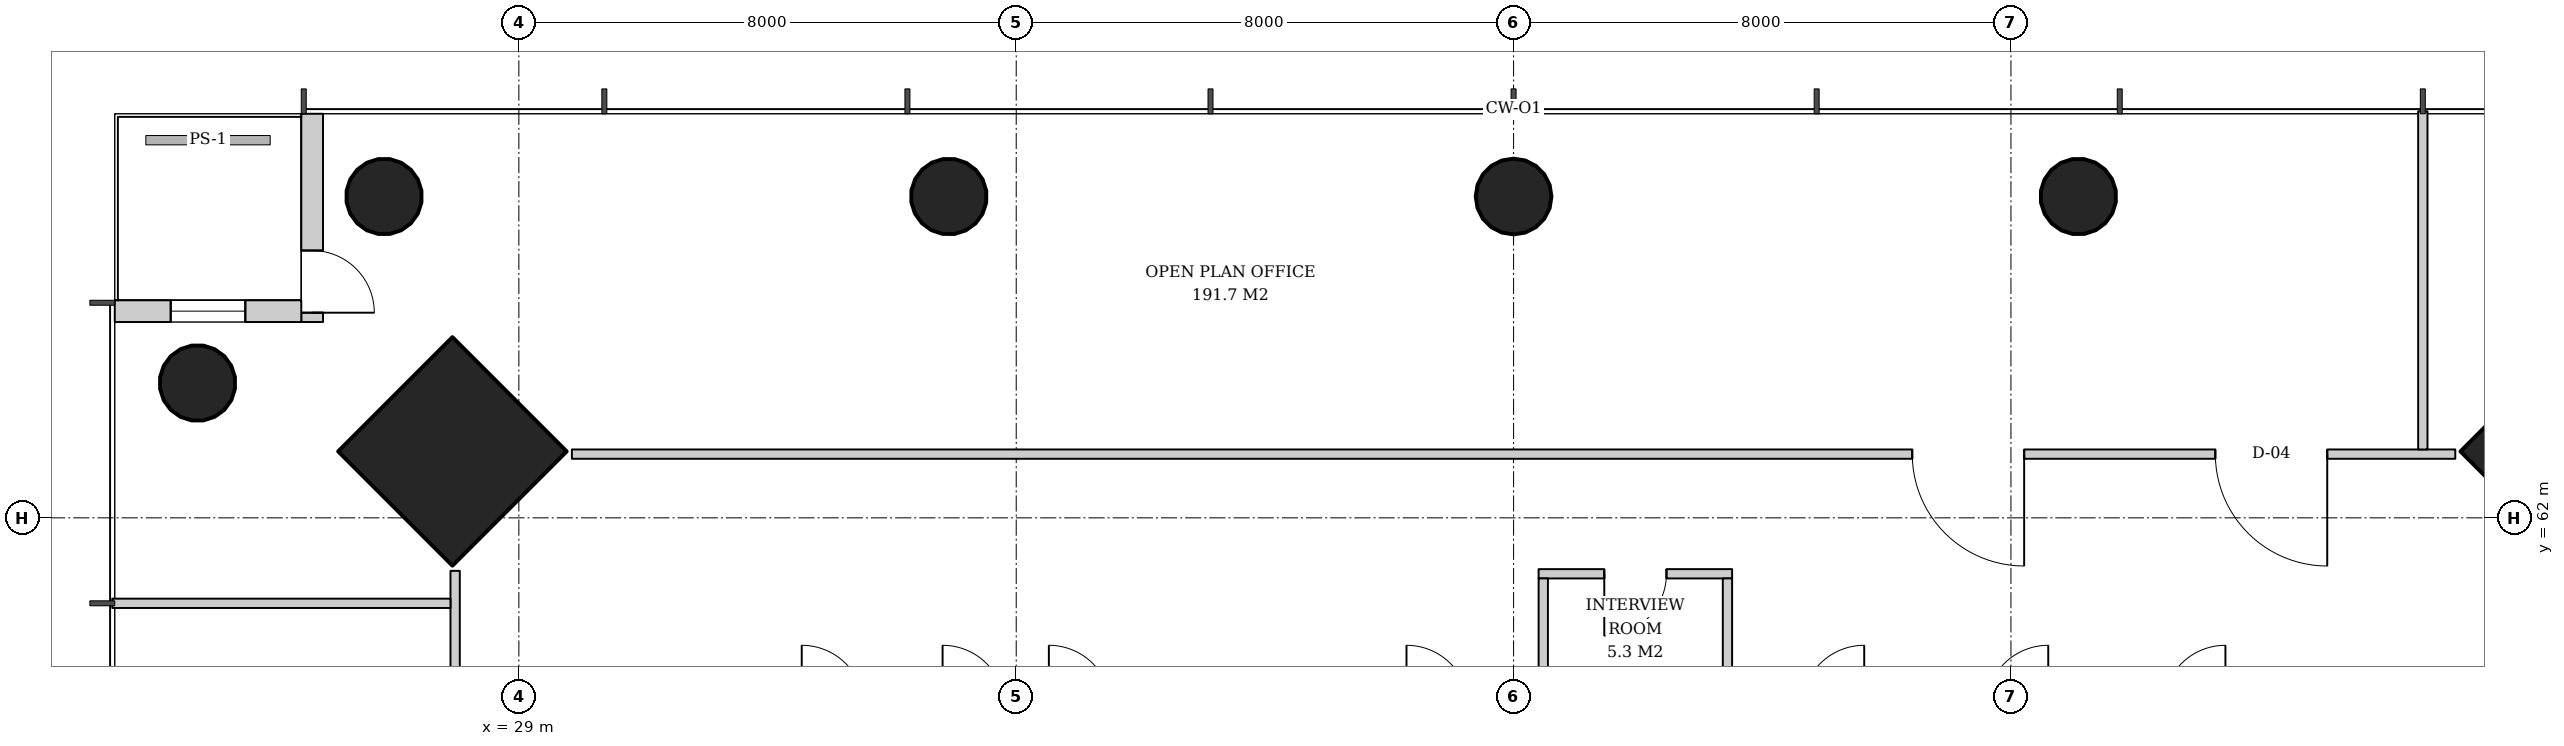
"""IFC4 building model, lengths in metres.
Left out: names, types, materials, properties, quantities, classifications, styles, units other than length and angle.
Written with IfcOpenShell. Run it as: python <this file> out.ifc"""

import sys

from ifc_helpers import new_model, si_unit, direction, frame, frame_2d, origin, origin_2d, place, context, subcontext, project, spatial, rectangle, hollow_circle, extrude, element, fill, save


model = new_model("IFC4")
c1 = context("Model", 3, precision=1e-05, world=origin(), true_north=direction((0.0, 1.0)))
c2 = subcontext(c1, "Body", "Model", "MODEL_VIEW")
j1 = project(units=[si_unit("LENGTHUNIT", "METRE"), si_unit("PLANEANGLEUNIT", "RADIAN")], contexts=[c1])
p1 = place(None, origin())
s1 = spatial("IfcSite", under=j1, at=p1, CompositionType="ELEMENT")
p2 = place(p1, origin())
s2 = spatial("IfcBuilding", under=s1, at=p2, CompositionType="ELEMENT")
p3 = place(p2, frame((0.0, 0.0, 108.4)))
s3 = spatial("IfcBuildingStorey", under=s2, at=p3, CompositionType="ELEMENT", Elevation=108.4)
for number, where, z_axis, x_axis in (
    (1, (62.107, 63.107, 0.0), (-0.032, -0.032, 0.999), (0.707, -0.707, 0.0)),
    (2, (27.893, 63.107, 0.0), (0.032, -0.032, 0.999), (0.707, 0.707, 0.0)),
):
    element("IfcColumn", number, at=place(p3, frame(where, z_axis=z_axis, x_axis=x_axis)), inside=s3, PredefinedType="COLUMN", context=c2, shape_type="SweptSolid", body=[
        extrude(rectangle(XDim=2.6, YDim=2.6, at=origin_2d()), origin(), (0.0, 0.0, 1.0), 3.804),
    ])
p4 = place(p3, frame((26.793, 67.207, 0.0), z_axis=(0.031898107953, -0.031898107953, 0.998981992539), x_axis=(0.707106781187, 0.707106781187, 0.0)))
e3 = element("IfcColumn", 3, at=p4, inside=s3, PredefinedType="COLUMN", context=c2, shape_type="SweptSolid", body=[
    extrude(hollow_circle(Radius=0.61, WallThickness=0.04, at=origin_2d()), origin(), (0.0, 0.0, 1.0), 3.804),
])
p5 = place(p3, frame((54.104, 67.207, 0.0), z_axis=(-0.015923048203, -0.031910302246, 0.999363892257), x_axis=(0.894786976326, -0.446493300058, 0.0)))
e4 = element("IfcColumn", 4, at=p5, inside=s3, PredefinedType="COLUMN", context=c2, shape_type="SweptSolid", body=[
    extrude(hollow_circle(Radius=0.61, WallThickness=0.04, at=origin_2d()), origin(), (0.0, 0.0, 1.0), 3.802),
])
p6 = place(p3, frame((45.0, 67.207, 0.0), z_axis=(0.0, -0.031914348339, 0.999490607445), x_axis=(1.0, 0.0, 0.0)))
e5 = element("IfcColumn", 5, at=p6, inside=s3, PredefinedType="COLUMN", context=c2, shape_type="SweptSolid", body=[
    extrude(hollow_circle(Radius=0.61, WallThickness=0.04, at=origin_2d()), origin(), (0.0, 0.0, 1.0), 3.802),
])
p7 = place(p3, frame((35.896, 67.207, 0.0), z_axis=(0.015923048203, -0.031910302246, 0.999363892257), x_axis=(0.894786976326, 0.446493300058, 0.0)))
e6 = element("IfcColumn", 6, at=p7, inside=s3, PredefinedType="COLUMN", context=c2, shape_type="SweptSolid", body=[
    extrude(hollow_circle(Radius=0.61, WallThickness=0.04, at=origin_2d()), origin(), (0.0, 0.0, 1.0), 3.802),
])
p8 = place(p3, frame((23.793, 64.207, 0.0), z_axis=(0.031898107953, -0.031898107953, 0.998981992539), x_axis=(0.707106781187, 0.707106781187, 0.0)))
e7 = element("IfcColumn", 7, at=p8, inside=s3, PredefinedType="COLUMN", context=c2, shape_type="SweptSolid", body=[
    extrude(hollow_circle(Radius=0.61, WallThickness=0.04, at=origin_2d()), origin(), (0.0, 0.0, 1.0), 3.804),
])
p9 = place(p3, frame((25.675, 68.5, 0.0), z_axis=(0.0, 0.0, 1.0), x_axis=(0.0, -1.0, 0.0)))
e8 = element("IfcWall", 8, at=p9, inside=s3, PredefinedType="SOLIDWALL", context=c2, shape_type="SweptSolid", body=[
    extrude(rectangle(XDim=3.35, YDim=0.35, at=frame_2d((1.675, 0.0))), origin(), (0.0, 0.0, 1.0), 3.62),
])
p10 = place(p9, frame((2.2, 0.0, 0.0)))
e9 = element("IfcOpeningElement", 9, at=p10, cuts=e8, PredefinedType="OPENING", context=c2, shape_type="SweptSolid", body=[
    extrude(rectangle(XDim=1.0, YDim=2.4, at=frame_2d((0.5, 1.2))), frame((0.0, 0.185, 0.0), z_axis=(0.0, -1.0, 0.0), x_axis=(1.0, 0.0, 0.0)), (0.0, 0.0, 1.0), 0.37),
])
p11 = place(p3, frame((25.5, 65.325, 0.0), z_axis=(0.0, 0.0, 1.0), x_axis=(-1.0, 0.0, 0.0)))
e10 = element("IfcWall", 10, at=p11, inside=s3, PredefinedType="SOLIDWALL", context=c2, shape_type="SweptSolid", body=[
    extrude(rectangle(XDim=3.0, YDim=0.35, at=frame_2d((1.5, 0.0))), origin(), (0.0, 0.0, 1.0), 3.62),
])
p12 = place(p11, frame((0.9, 0.0, 0.6)))
e11 = element("IfcOpeningElement", 11, at=p12, cuts=e10, PredefinedType="OPENING", context=c2, shape_type="SweptSolid", body=[
    extrude(rectangle(XDim=1.2, YDim=2.55, at=frame_2d((0.6, 1.275))), frame((0.0, 0.185, 0.0), z_axis=(0.0, -1.0, 0.0), x_axis=(1.0, 0.0, 0.0)), (0.0, 0.0, 1.0), 0.37),
])
p13 = place(p3, frame((48.515, 61.1, 0.0), z_axis=(0.0, 0.0, 1.0), x_axis=(-1.0, 0.0, 0.0)))
e12 = element("IfcWall", 12, at=p13, inside=s3, PredefinedType="PARTITIONING", context=c2, shape_type="SweptSolid", body=[
    extrude(rectangle(XDim=3.112, YDim=0.15, at=frame_2d((1.556, 0.0))), origin(), (0.0, 0.0, 1.0), 3.62),
])
p14 = place(p13, frame((1.056, 0.0, 0.0)))
e13 = element("IfcOpeningElement", 13, at=p14, cuts=e12, PredefinedType="OPENING", context=c2, shape_type="SweptSolid", body=[
    extrude(rectangle(XDim=1.0, YDim=2.1, at=frame_2d((0.5, 1.05))), frame((0.0, 0.085, 0.0), z_axis=(0.0, -1.0, 0.0), x_axis=(1.0, 0.0, 0.0)), (0.0, 0.0, 1.0), 0.17),
])
for number, where, z_axis, x_axis in (
    (14, (48.44, 59.3, 0.0), (0.0, 0.0, 1.0), (0.0, 1.0, 0.0)),
    (15, (45.478, 59.3, 0.0), (0.0, 0.0, 1.0), (0.0, 1.0, 0.0)),
):
    element("IfcWall", number, at=place(p3, frame(where, z_axis=z_axis, x_axis=x_axis)), inside=s3, PredefinedType="PARTITIONING", context=c2, shape_type="SweptSolid", body=[
        extrude(rectangle(XDim=1.725, YDim=0.15, at=frame_2d((0.862, 0.0))), origin(), (0.0, 0.0, 1.0), 3.62),
    ])
p15 = place(p3, frame((60.147, 63.025, 0.0), z_axis=(0.0, 0.0, 1.0), x_axis=(-1.0, 0.0, 0.0)))
e16 = element("IfcWall", 16, at=p15, inside=s3, PredefinedType="PARTITIONING", context=c2, shape_type="SweptSolid", body=[
    extrude(rectangle(XDim=30.294, YDim=0.15, at=frame_2d((15.147, 0.0))), origin(), (0.0, 0.0, 1.0), 2.72),
])
p16 = place(p15, frame((2.06, 0.0, 0.0)))
e17 = element("IfcOpeningElement", 17, at=p16, cuts=e16, PredefinedType="OPENING", context=c2, shape_type="SweptSolid", body=[
    extrude(rectangle(XDim=1.8, YDim=2.4, at=frame_2d((0.9, 1.2))), frame((0.0, 0.085, 0.0), z_axis=(0.0, -1.0, 0.0), x_axis=(1.0, 0.0, 0.0)), (0.0, 0.0, 1.0), 0.17),
])
p17 = place(p15, frame((6.935, 0.0, 0.0)))
e18 = element("IfcOpeningElement", 18, at=p17, cuts=e16, PredefinedType="OPENING", context=c2, shape_type="SweptSolid", body=[
    extrude(rectangle(XDim=1.8, YDim=2.4, at=frame_2d((0.9, 1.2))), frame((0.0, 0.085, 0.0), z_axis=(0.0, -1.0, 0.0), x_axis=(1.0, 0.0, 0.0)), (0.0, 0.0, 1.0), 0.17),
])
p18 = place(p3, frame((59.625, 63.1, 0.0), z_axis=(0.0, 0.0, 1.0), x_axis=(0.0, 1.0, 0.0)))
e19 = element("IfcWall", 19, at=p18, inside=s3, PredefinedType="PARTITIONING", context=c2, shape_type="SweptSolid", body=[
    extrude(rectangle(XDim=5.44, YDim=0.15, at=frame_2d((2.72, 0.0))), origin(), (0.0, 0.0, 1.0), 2.82),
])
p19 = place(p3, frame((27.975, 61.147, 0.0), z_axis=(0.0, 0.0, 1.0), x_axis=(0.0, -1.0, 0.0)))
e20 = element("IfcWall", 20, at=p19, inside=s3, PredefinedType="PARTITIONING", context=c2, shape_type="SweptSolid", body=[
    extrude(rectangle(XDim=30.294, YDim=0.15, at=frame_2d((15.147, 0.0))), origin(), (0.0, 0.0, 1.0), 2.72),
])
p20 = place(p19, frame((2.46, 0.0, 0.0)))
e21 = element("IfcOpeningElement", 21, at=p20, cuts=e20, PredefinedType="OPENING", context=c2, shape_type="SweptSolid", body=[
    extrude(rectangle(XDim=1.0, YDim=2.1, at=frame_2d((0.5, 1.05))), frame((0.0, 0.085, 0.0), z_axis=(0.0, -1.0, 0.0), x_axis=(1.0, 0.0, 0.0)), (0.0, 0.0, 1.0), 0.17),
])
p21 = place(p19, frame((7.335, 0.0, 0.0)))
e22 = element("IfcOpeningElement", 22, at=p21, cuts=e20, PredefinedType="OPENING", context=c2, shape_type="SweptSolid", body=[
    extrude(rectangle(XDim=1.0, YDim=2.1, at=frame_2d((0.5, 1.05))), frame((0.0, 0.085, 0.0), z_axis=(0.0, -1.0, 0.0), x_axis=(1.0, 0.0, 0.0)), (0.0, 0.0, 1.0), 0.17),
])
p22 = place(p19, frame((12.21, 0.0, 0.0)))
e23 = element("IfcOpeningElement", 23, at=p22, cuts=e20, PredefinedType="OPENING", context=c2, shape_type="SweptSolid", body=[
    extrude(rectangle(XDim=1.0, YDim=2.1, at=frame_2d((0.5, 1.05))), frame((0.0, 0.085, 0.0), z_axis=(0.0, -1.0, 0.0), x_axis=(1.0, 0.0, 0.0)), (0.0, 0.0, 1.0), 0.17),
])
p23 = place(p19, frame((17.185, 0.0, 0.0)))
e24 = element("IfcOpeningElement", 24, at=p23, cuts=e20, PredefinedType="OPENING", context=c2, shape_type="SweptSolid", body=[
    extrude(rectangle(XDim=0.8, YDim=2.1, at=frame_2d((0.4, 1.05))), frame((0.0, 0.085, 0.0), z_axis=(0.0, -1.0, 0.0), x_axis=(1.0, 0.0, 0.0)), (0.0, 0.0, 1.0), 0.17),
])
p24 = place(p19, frame((21.96, 0.0, 0.0)))
e25 = element("IfcOpeningElement", 25, at=p24, cuts=e20, PredefinedType="OPENING", context=c2, shape_type="SweptSolid", body=[
    extrude(rectangle(XDim=1.0, YDim=2.1, at=frame_2d((0.5, 1.05))), frame((0.0, 0.085, 0.0), z_axis=(0.0, -1.0, 0.0), x_axis=(1.0, 0.0, 0.0)), (0.0, 0.0, 1.0), 0.17),
])
p25 = place(p19, frame((26.935, 0.0, 0.0)))
e26 = element("IfcOpeningElement", 26, at=p25, cuts=e20, PredefinedType="OPENING", context=c2, shape_type="SweptSolid", body=[
    extrude(rectangle(XDim=0.8, YDim=2.1, at=frame_2d((0.4, 1.05))), frame((0.0, 0.085, 0.0), z_axis=(0.0, -1.0, 0.0), x_axis=(1.0, 0.0, 0.0)), (0.0, 0.0, 1.0), 0.17),
])
p26 = place(p3, frame((27.9, 60.625, 0.0), z_axis=(0.0, 0.0, 1.0), x_axis=(-1.0, 0.0, 0.0)))
e27 = element("IfcWall", 27, at=p26, inside=s3, PredefinedType="PARTITIONING", context=c2, shape_type="SweptSolid", body=[
    extrude(rectangle(XDim=5.44, YDim=0.15, at=frame_2d((2.72, 0.0))), origin(), (0.0, 0.0, 1.0), 2.82),
])
p27 = place(p10, origin())
e28 = element("IfcDoor", 28, at=p27, inside=s3, OperationType="SINGLE_SWING_RIGHT", PredefinedType="DOOR", context=c2, shape_type="SweptSolid", body=[
    extrude(rectangle(XDim=1.0, YDim=2.4, at=frame_2d((0.5, 1.2))), frame((0.0, 0.025, 0.0), z_axis=(0.0, -1.0, 0.0), x_axis=(1.0, 0.0, 0.0)), (0.0, 0.0, 1.0), 0.05),
])
fill(e9, e28)
p28 = place(p12, origin())
e29 = element("IfcWindow", 29, at=p28, inside=s3, PartitioningType="SINGLE_PANEL", PredefinedType="WINDOW", context=c2, shape_type="SweptSolid", body=[
    extrude(rectangle(XDim=1.2, YDim=2.55, at=frame_2d((0.6, 1.275))), frame((0.0, 0.03, 0.0), z_axis=(0.0, -1.0, 0.0), x_axis=(1.0, 0.0, 0.0)), (0.0, 0.0, 1.0), 0.06),
])
fill(e11, e29)
p29 = place(p14, origin())
e30 = element("IfcDoor", 30, at=p29, inside=s3, OperationType="SINGLE_SWING_RIGHT", PredefinedType="DOOR", context=c2, shape_type="SweptSolid", body=[
    extrude(rectangle(XDim=1.0, YDim=2.1, at=frame_2d((0.5, 1.05))), frame((0.0, 0.025, 0.0), z_axis=(0.0, -1.0, 0.0), x_axis=(1.0, 0.0, 0.0)), (0.0, 0.0, 1.0), 0.05),
])
fill(e13, e30)
p30 = place(p16, origin())
e31 = element("IfcDoor", 31, at=p30, inside=s3, OperationType="DOUBLE_DOOR_SINGLE_SWING", PredefinedType="DOOR", context=c2, shape_type="SweptSolid", body=[
    extrude(rectangle(XDim=1.8, YDim=2.4, at=frame_2d((0.9, 1.2))), frame((0.0, 0.025, 0.0), z_axis=(0.0, -1.0, 0.0), x_axis=(1.0, 0.0, 0.0)), (0.0, 0.0, 1.0), 0.05),
])
fill(e17, e31)
p31 = place(p17, origin())
e32 = element("IfcDoor", 32, at=p31, inside=s3, OperationType="DOUBLE_DOOR_SINGLE_SWING", PredefinedType="DOOR", context=c2, shape_type="SweptSolid", body=[
    extrude(rectangle(XDim=1.8, YDim=2.4, at=frame_2d((0.9, 1.2))), frame((0.0, 0.025, 0.0), z_axis=(0.0, -1.0, 0.0), x_axis=(1.0, 0.0, 0.0)), (0.0, 0.0, 1.0), 0.05),
])
fill(e18, e32)
save(model, sys.argv[1])
